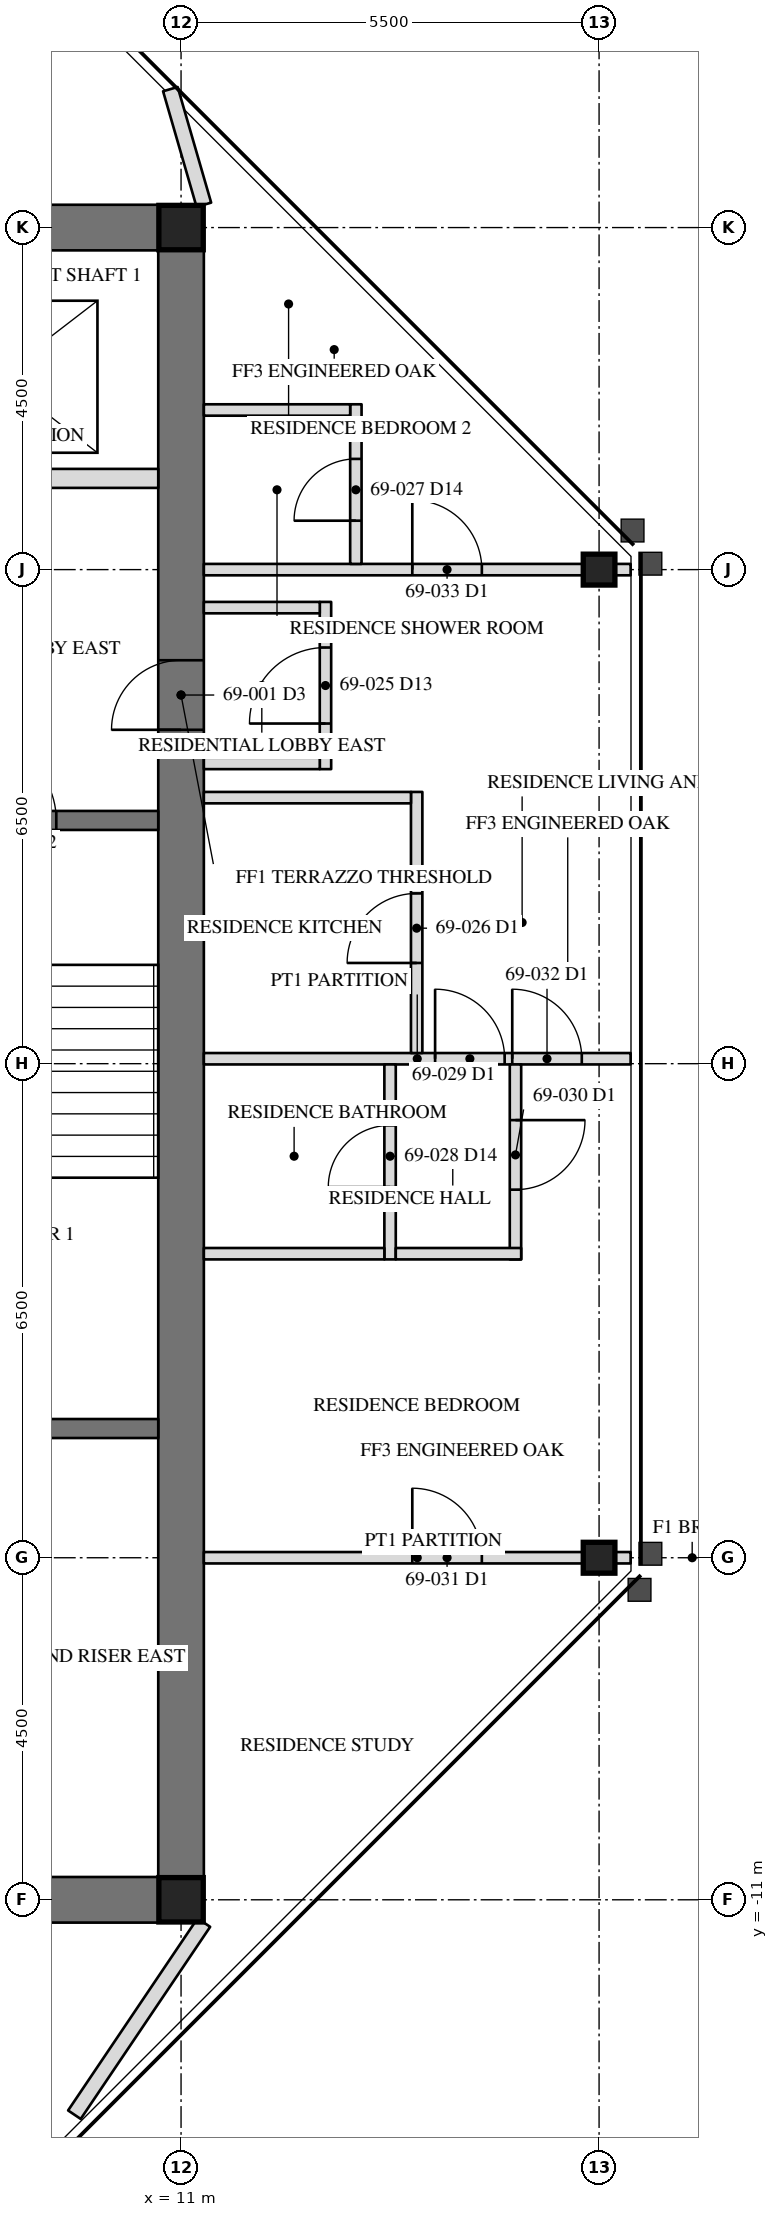
"""IFC4 building model, lengths in metres.
Left out: names, types, materials, properties, quantities, classifications, styles, units other than length and angle.
Written with IfcOpenShell. Run it as: python <this file> out.ifc"""

import sys

from ifc_helpers import new_model, si_unit, direction, frame, frame_2d, origin, origin_2d, place, context, subcontext, project, spatial, rectangle, hollow_rectangle, i_section, extrude, element, fill, save


model = new_model("IFC4")
c1 = context("Model", 3, precision=1e-05, world=origin(), true_north=direction((0.0, 1.0)))
c2 = subcontext(c1, "Body", "Model", "MODEL_VIEW")
j1 = project(units=[si_unit("LENGTHUNIT", "METRE"), si_unit("PLANEANGLEUNIT", "RADIAN")], contexts=[c1])
p1 = place(None, origin())
s1 = spatial("IfcSite", under=j1, at=p1, CompositionType="ELEMENT")
p2 = place(p1, origin())
s2 = spatial("IfcBuilding", under=s1, at=p2, CompositionType="ELEMENT")
p3 = place(p2, frame((0.0, 0.0, 281.2)))
s3 = spatial("IfcBuildingStorey", under=s2, at=p3, CompositionType="ELEMENT", Elevation=281.2)
for number, where, z_axis, x_axis in (
    (1, (16.5, -6.5, 0.0), (0.0, 0.0, 1.0), (0.0, 1.0, 0.0)),
    (2, (16.5, 6.5, 0.0), (0.0, 0.0, 1.0), (0.0, 1.0, 0.0)),
):
    element("IfcColumn", number, at=place(p3, frame(where, z_axis=z_axis, x_axis=x_axis)), inside=s3, PredefinedType="COLUMN", context=c2, shape_type="SweptSolid", body=[
        extrude(i_section(OverallWidth=0.406, OverallDepth=0.417, WebThickness=0.03, FlangeThickness=0.048, at=origin_2d()), origin(), (0.0, 0.0, 1.0), 3.6),
    ])
p4 = place(p3, frame((11.0, -11.0, 0.0), z_axis=(0.0, 0.0, 1.0), x_axis=(0.0, 1.0, 0.0)))
e3 = element("IfcWall", 3, at=p4, inside=s3, PredefinedType="SHEAR", context=c2, shape_type="SweptSolid", body=[
    extrude(rectangle(XDim=22.0, YDim=0.6, at=frame_2d((11.0, 0.0))), origin(), (0.0, 0.0, 1.0), 3.6),
])
p5 = place(p4, frame((15.393, 0.0, 0.0)))
e4 = element("IfcOpeningElement", 4, at=p5, cuts=e3, PredefinedType="OPENING", context=c2, shape_type="SweptSolid", body=[
    extrude(rectangle(XDim=0.915, YDim=2.134, at=frame_2d((0.458, 1.067))), frame((0.0, 0.31, 0.0), z_axis=(0.0, -1.0, 0.0), x_axis=(1.0, 0.0, 0.0)), (0.0, 0.0, 1.0), 0.62),
])
for number, where, z_axis, x_axis in (
    (5, (11.0, 11.0, 0.0), (0.0, 0.0, 1.0), (-1.0, 0.0, 0.0)),
    (6, (6.5, -11.0, 0.0), (0.0, 0.0, 1.0), (1.0, 0.0, 0.0)),
):
    element("IfcWall", number, at=place(p3, frame(where, z_axis=z_axis, x_axis=x_axis)), inside=s3, PredefinedType="SHEAR", context=c2, shape_type="SweptSolid", body=[
        extrude(rectangle(XDim=4.5, YDim=0.6, at=frame_2d((2.25, 0.0))), origin(), (0.0, 0.0, 1.0), 3.6),
    ])
for number, where, z_axis, x_axis in (
    (7, (11.0, 11.0, 0.0), (0.0, 0.0, 1.0), (1.0, 0.0, 0.0)),
    (8, (11.0, -11.0, 0.0), (0.0, 0.0, 1.0), (1.0, 0.0, 0.0)),
):
    element("IfcColumn", number, at=place(p3, frame(where, z_axis=z_axis, x_axis=x_axis)), inside=s3, PredefinedType="COLUMN", context=c2, shape_type="SweptSolid", body=[
        extrude(hollow_rectangle(XDim=0.584, YDim=0.584, WallThickness=0.051, at=origin_2d()), origin(), (0.0, 0.0, 1.0), 3.6),
    ])
p6 = place(p3, frame((6.95, -4.8, 0.0), z_axis=(0.0, 0.0, 1.0), x_axis=(1.0, 0.0, 0.0)))
e9 = element("IfcWall", 9, at=p6, inside=s3, PredefinedType="SOLIDWALL", context=c2, shape_type="SweptSolid", body=[
    extrude(rectangle(XDim=3.75, YDim=0.25, at=frame_2d((1.875, 0.0))), origin(), (0.0, 0.0, 1.0), 3.41),
])
p7 = place(p3, frame((6.95, 3.2, 0.0), z_axis=(0.0, 0.0, 1.0), x_axis=(1.0, 0.0, 0.0)))
e10 = element("IfcWall", 10, at=p7, inside=s3, PredefinedType="SOLIDWALL", context=c2, shape_type="SweptSolid", body=[
    extrude(rectangle(XDim=3.75, YDim=0.25, at=frame_2d((1.875, 0.0))), origin(), (0.0, 0.0, 1.0), 3.41),
])
p8 = place(p7, frame((1.342, 0.0, 0.0)))
e11 = element("IfcOpeningElement", 11, at=p8, cuts=e10, PredefinedType="OPENING", context=c2, shape_type="SweptSolid", body=[
    extrude(rectangle(XDim=1.067, YDim=2.134, at=frame_2d((0.533, 1.067))), frame((0.0, 0.135, 0.0), z_axis=(0.0, -1.0, 0.0), x_axis=(1.0, 0.0, 0.0)), (0.0, 0.0, 1.0), 0.27),
])
p9 = place(p3, frame((6.95, 7.7, 0.0), z_axis=(0.0, 0.0, 1.0), x_axis=(1.0, 0.0, 0.0)))
e12 = element("IfcWall", 12, at=p9, inside=s3, PredefinedType="PARTITIONING", context=c2, shape_type="SweptSolid", body=[
    extrude(rectangle(XDim=3.75, YDim=0.25, at=frame_2d((1.875, 0.0))), origin(), (0.0, 0.0, 1.0), 3.41),
])
p10 = place(p9, frame((0.45, 0.0, 0.0)))
e13 = element("IfcOpeningElement", 13, at=p10, cuts=e12, PredefinedType="OPENING", context=c2, shape_type="SweptSolid", body=[
    extrude(rectangle(XDim=1.219, YDim=2.134, at=frame_2d((0.609, 1.067))), frame((0.0, 0.135, 0.0), z_axis=(0.0, -1.0, 0.0), x_axis=(1.0, 0.0, 0.0)), (0.0, 0.0, 1.0), 0.27),
])
p11 = place(p3, frame((11.3, 11.3, 0.0), z_axis=(0.0, 0.0, 1.0), x_axis=(-0.278099250491, 0.960552344683, 0.0)))
e14 = element("IfcWall", 14, at=p11, inside=s3, PredefinedType="PARTITIONING", context=c2, shape_type="SweptSolid", body=[
    extrude(rectangle(XDim=1.584, YDim=0.2, at=frame_2d((0.792, 0.0))), origin(), (0.0, 0.0, 1.0), 3.41),
])
p12 = place(p3, frame((11.3, -11.3, 0.0), z_axis=(0.0, 0.0, 1.0), x_axis=(-0.558834300538, -0.829279340477, 0.0)))
e15 = element("IfcWall", 15, at=p12, inside=s3, PredefinedType="PARTITIONING", context=c2, shape_type="SweptSolid", body=[
    extrude(rectangle(XDim=3.048, YDim=0.2, at=frame_2d((1.524, 0.0))), origin(), (0.0, 0.0, 1.0), 2.704),
])
p13 = place(p3, frame((11.3, -6.5, 0.0), z_axis=(0.0, 0.0, 1.0), x_axis=(1.0, 0.0, 0.0)))
e16 = element("IfcWall", 16, at=p13, inside=s3, PredefinedType="PARTITIONING", context=c2, shape_type="SweptSolid", body=[
    extrude(rectangle(XDim=5.615, YDim=0.15, at=frame_2d((2.808, 0.0))), origin(), (0.0, 0.0, 1.0), 2.966),
])
p14 = place(p13, frame((2.742, 0.0, 0.0)))
e17 = element("IfcOpeningElement", 17, at=p14, cuts=e16, PredefinedType="OPENING", context=c2, shape_type="SweptSolid", body=[
    extrude(rectangle(XDim=0.915, YDim=2.134, at=frame_2d((0.458, 1.067))), frame((0.0, 0.085, 0.0), z_axis=(0.0, -1.0, 0.0), x_axis=(1.0, 0.0, 0.0)), (0.0, 0.0, 1.0), 0.17),
])
p15 = place(p3, frame((11.3, 0.065, 0.0), z_axis=(0.0, 0.0, 1.0), x_axis=(1.0, 0.0, 0.0)))
e18 = element("IfcWall", 18, at=p15, inside=s3, PredefinedType="PARTITIONING", context=c2, shape_type="SweptSolid", body=[
    extrude(rectangle(XDim=5.615, YDim=0.15, at=frame_2d((2.808, 0.0))), origin(), (0.0, 0.0, 1.0), 2.709),
])
p16 = place(p15, frame((3.042, 0.0, 0.0)))
e19 = element("IfcOpeningElement", 19, at=p16, cuts=e18, PredefinedType="OPENING", context=c2, shape_type="SweptSolid", body=[
    extrude(rectangle(XDim=0.915, YDim=2.134, at=frame_2d((0.458, 1.067))), frame((0.0, 0.085, 0.0), z_axis=(0.0, -1.0, 0.0), x_axis=(1.0, 0.0, 0.0)), (0.0, 0.0, 1.0), 0.17),
])
p17 = place(p15, frame((4.058, 0.0, 0.0)))
e20 = element("IfcOpeningElement", 20, at=p17, cuts=e18, PredefinedType="OPENING", context=c2, shape_type="SweptSolid", body=[
    extrude(rectangle(XDim=0.915, YDim=2.134, at=frame_2d((0.458, 1.067))), frame((0.0, 0.085, 0.0), z_axis=(0.0, -1.0, 0.0), x_axis=(1.0, 0.0, 0.0)), (0.0, 0.0, 1.0), 0.17),
])
p18 = place(p3, frame((11.3, 6.5, 0.0), z_axis=(0.0, 0.0, 1.0), x_axis=(1.0, 0.0, 0.0)))
e21 = element("IfcWall", 21, at=p18, inside=s3, PredefinedType="PARTITIONING", context=c2, shape_type="SweptSolid", body=[
    extrude(rectangle(XDim=5.615, YDim=0.15, at=frame_2d((2.808, 0.0))), origin(), (0.0, 0.0, 1.0), 2.966),
])
p19 = place(p18, frame((2.742, 0.0, 0.0)))
e22 = element("IfcOpeningElement", 22, at=p19, cuts=e21, PredefinedType="OPENING", context=c2, shape_type="SweptSolid", body=[
    extrude(rectangle(XDim=0.915, YDim=2.134, at=frame_2d((0.458, 1.067))), frame((0.0, 0.085, 0.0), z_axis=(0.0, -1.0, 0.0), x_axis=(1.0, 0.0, 0.0)), (0.0, 0.0, 1.0), 0.17),
])
p20 = place(p3, frame((12.9, 3.875, 0.0), z_axis=(0.0, 0.0, 1.0), x_axis=(0.0, 1.0, 0.0)))
e23 = element("IfcWall", 23, at=p20, inside=s3, PredefinedType="PARTITIONING", context=c2, shape_type="SweptSolid", body=[
    extrude(rectangle(XDim=2.2, YDim=0.15, at=frame_2d((1.1, 0.0))), origin(), (0.0, 0.0, 1.0), 3.41),
])
p21 = place(p20, frame((0.6, 0.0, 0.0)))
e24 = element("IfcOpeningElement", 24, at=p21, cuts=e23, PredefinedType="OPENING", context=c2, shape_type="SweptSolid", body=[
    extrude(rectangle(XDim=1.0, YDim=2.134, at=frame_2d((0.5, 1.067))), frame((0.0, 0.085, 0.0), z_axis=(0.0, -1.0, 0.0), x_axis=(1.0, 0.0, 0.0)), (0.0, 0.0, 1.0), 0.17),
])
for number, where, z_axis, x_axis in (
    (25, (11.3, 3.95, 0.0), (0.0, 0.0, 1.0), (1.0, 0.0, 0.0)),
    (26, (11.3, 6.0, 0.0), (0.0, 0.0, 1.0), (1.0, 0.0, 0.0)),
):
    element("IfcWall", number, at=place(p3, frame(where, z_axis=z_axis, x_axis=x_axis)), inside=s3, PredefinedType="PARTITIONING", context=c2, shape_type="SweptSolid", body=[
        extrude(rectangle(XDim=1.525, YDim=0.15, at=frame_2d((0.762, 0.0))), origin(), (0.0, 0.0, 1.0), 3.41),
    ])
p22 = place(p3, frame((14.1, 0.14, 0.0), z_axis=(0.0, 0.0, 1.0), x_axis=(0.0, 1.0, 0.0)))
e27 = element("IfcWall", 27, at=p22, inside=s3, PredefinedType="PARTITIONING", context=c2, shape_type="SweptSolid", body=[
    extrude(rectangle(XDim=3.435, YDim=0.15, at=frame_2d((1.718, 0.0))), origin(), (0.0, 0.0, 1.0), 3.41),
])
p23 = place(p22, frame((1.185, 0.0, 0.0)))
e28 = element("IfcOpeningElement", 28, at=p23, cuts=e27, PredefinedType="OPENING", context=c2, shape_type="SweptSolid", body=[
    extrude(rectangle(XDim=0.915, YDim=2.134, at=frame_2d((0.458, 1.067))), frame((0.0, 0.085, 0.0), z_axis=(0.0, -1.0, 0.0), x_axis=(1.0, 0.0, 0.0)), (0.0, 0.0, 1.0), 0.17),
])
p24 = place(p3, frame((11.3, 3.5, 0.0), z_axis=(0.0, 0.0, 1.0), x_axis=(1.0, 0.0, 0.0)))
e29 = element("IfcWall", 29, at=p24, inside=s3, PredefinedType="PARTITIONING", context=c2, shape_type="SweptSolid", body=[
    extrude(rectangle(XDim=2.725, YDim=0.15, at=frame_2d((1.362, 0.0))), origin(), (0.0, 0.0, 1.0), 3.41),
])
p25 = place(p3, frame((13.3, 6.575, 0.0), z_axis=(0.0, 0.0, 1.0), x_axis=(0.0, 1.0, 0.0)))
e30 = element("IfcWall", 30, at=p25, inside=s3, PredefinedType="PARTITIONING", context=c2, shape_type="SweptSolid", body=[
    extrude(rectangle(XDim=2.1, YDim=0.15, at=frame_2d((1.05, 0.0))), origin(), (0.0, 0.0, 1.0), 3.41),
])
p26 = place(p25, frame((0.569, 0.0, 0.0)))
e31 = element("IfcOpeningElement", 31, at=p26, cuts=e30, PredefinedType="OPENING", context=c2, shape_type="SweptSolid", body=[
    extrude(rectangle(XDim=0.813, YDim=2.032, at=frame_2d((0.406, 1.016))), frame((0.0, 0.085, 0.0), z_axis=(0.0, -1.0, 0.0), x_axis=(1.0, 0.0, 0.0)), (0.0, 0.0, 1.0), 0.17),
])
p27 = place(p3, frame((11.3, 8.6, 0.0), z_axis=(0.0, 0.0, 1.0), x_axis=(1.0, 0.0, 0.0)))
e32 = element("IfcWall", 32, at=p27, inside=s3, PredefinedType="PARTITIONING", context=c2, shape_type="SweptSolid", body=[
    extrude(rectangle(XDim=1.925, YDim=0.15, at=frame_2d((0.962, 0.0))), origin(), (0.0, 0.0, 1.0), 3.41),
])
p28 = place(p3, frame((13.75, -2.575, 0.0), z_axis=(0.0, 0.0, 1.0), x_axis=(0.0, 1.0, 0.0)))
e33 = element("IfcWall", 33, at=p28, inside=s3, PredefinedType="PARTITIONING", context=c2, shape_type="SweptSolid", body=[
    extrude(rectangle(XDim=2.565, YDim=0.15, at=frame_2d((1.282, 0.0))), origin(), (0.0, 0.0, 1.0), 3.41),
])
p29 = place(p28, frame((0.951, 0.0, 0.0)))
e34 = element("IfcOpeningElement", 34, at=p29, cuts=e33, PredefinedType="OPENING", context=c2, shape_type="SweptSolid", body=[
    extrude(rectangle(XDim=0.813, YDim=2.032, at=frame_2d((0.406, 1.016))), frame((0.0, 0.085, 0.0), z_axis=(0.0, -1.0, 0.0), x_axis=(1.0, 0.0, 0.0)), (0.0, 0.0, 1.0), 0.17),
])
p30 = place(p3, frame((11.3, -2.5, 0.0), z_axis=(0.0, 0.0, 1.0), x_axis=(1.0, 0.0, 0.0)))
e35 = element("IfcWall", 35, at=p30, inside=s3, PredefinedType="PARTITIONING", context=c2, shape_type="SweptSolid", body=[
    extrude(rectangle(XDim=2.375, YDim=0.15, at=frame_2d((1.188, 0.0))), origin(), (0.0, 0.0, 1.0), 3.41),
])
p31 = place(p3, frame((15.4, -0.01, 0.0), z_axis=(0.0, 0.0, 1.0), x_axis=(0.0, -1.0, 0.0)))
e36 = element("IfcWall", 36, at=p31, inside=s3, PredefinedType="PARTITIONING", context=c2, shape_type="SweptSolid", body=[
    extrude(rectangle(XDim=2.565, YDim=0.15, at=frame_2d((1.282, 0.0))), origin(), (0.0, 0.0, 1.0), 3.41),
])
p32 = place(p31, frame((0.732, 0.0, 0.0)))
e37 = element("IfcOpeningElement", 37, at=p32, cuts=e36, PredefinedType="OPENING", context=c2, shape_type="SweptSolid", body=[
    extrude(rectangle(XDim=0.915, YDim=2.134, at=frame_2d((0.458, 1.067))), frame((0.0, 0.085, 0.0), z_axis=(0.0, -1.0, 0.0), x_axis=(1.0, 0.0, 0.0)), (0.0, 0.0, 1.0), 0.17),
])
p33 = place(p3, frame((13.825, -2.5, 0.0), z_axis=(0.0, 0.0, 1.0), x_axis=(1.0, 0.0, 0.0)))
e38 = element("IfcWall", 38, at=p33, inside=s3, PredefinedType="PARTITIONING", context=c2, shape_type="SweptSolid", body=[
    extrude(rectangle(XDim=1.65, YDim=0.15, at=frame_2d((0.825, 0.0))), origin(), (0.0, 0.0, 1.0), 3.41),
])
p34 = place(p5, origin())
e39 = element("IfcDoor", 39, at=p34, inside=s3, OperationType="SINGLE_SWING_RIGHT", PredefinedType="DOOR", context=c2, shape_type="SweptSolid", body=[
    extrude(rectangle(XDim=0.915, YDim=2.134, at=frame_2d((0.458, 1.067))), frame((0.0, -0.225, 0.0), z_axis=(0.0, -1.0, 0.0), x_axis=(1.0, 0.0, 0.0)), (0.0, 0.0, 1.0), 0.05),
])
fill(e4, e39)
p35 = place(p8, origin())
e40 = element("IfcDoor", 40, at=p35, inside=s3, OperationType="SINGLE_SWING_LEFT", PredefinedType="DOOR", context=c2, shape_type="SweptSolid", body=[
    extrude(rectangle(XDim=1.067, YDim=2.134, at=frame_2d((0.533, 1.067))), frame((0.0, 0.025, 0.0), z_axis=(0.0, -1.0, 0.0), x_axis=(1.0, 0.0, 0.0)), (0.0, 0.0, 1.0), 0.05),
])
fill(e11, e40)
p36 = place(p21, origin())
e41 = element("IfcDoor", 41, at=p36, inside=s3, OperationType="SINGLE_SWING_RIGHT", PredefinedType="DOOR", context=c2, shape_type="SweptSolid", body=[
    extrude(rectangle(XDim=1.0, YDim=2.134, at=frame_2d((0.5, 1.067))), frame((0.0, 0.025, 0.0), z_axis=(0.0, -1.0, 0.0), x_axis=(1.0, 0.0, 0.0)), (0.0, 0.0, 1.0), 0.05),
])
fill(e24, e41)
p37 = place(p23, origin())
e42 = element("IfcDoor", 42, at=p37, inside=s3, OperationType="SINGLE_SWING_LEFT", PredefinedType="DOOR", context=c2, shape_type="SweptSolid", body=[
    extrude(rectangle(XDim=0.915, YDim=2.134, at=frame_2d((0.458, 1.067))), frame((0.0, 0.025, 0.0), z_axis=(0.0, -1.0, 0.0), x_axis=(1.0, 0.0, 0.0)), (0.0, 0.0, 1.0), 0.05),
])
fill(e28, e42)
p38 = place(p26, origin())
e43 = element("IfcDoor", 43, at=p38, inside=s3, OperationType="SINGLE_SWING_LEFT", PredefinedType="DOOR", context=c2, shape_type="SweptSolid", body=[
    extrude(rectangle(XDim=0.813, YDim=2.032, at=frame_2d((0.406, 1.016))), frame((0.0, 0.025, 0.0), z_axis=(0.0, -1.0, 0.0), x_axis=(1.0, 0.0, 0.0)), (0.0, 0.0, 1.0), 0.05),
])
fill(e31, e43)
p39 = place(p29, origin())
e44 = element("IfcDoor", 44, at=p39, inside=s3, OperationType="SINGLE_SWING_LEFT", PredefinedType="DOOR", context=c2, shape_type="SweptSolid", body=[
    extrude(rectangle(XDim=0.813, YDim=2.032, at=frame_2d((0.406, 1.016))), frame((0.0, 0.025, 0.0), z_axis=(0.0, -1.0, 0.0), x_axis=(1.0, 0.0, 0.0)), (0.0, 0.0, 1.0), 0.05),
])
fill(e34, e44)
p40 = place(p16, origin())
e45 = element("IfcDoor", 45, at=p40, inside=s3, OperationType="SINGLE_SWING_LEFT", PredefinedType="DOOR", context=c2, shape_type="SweptSolid", body=[
    extrude(rectangle(XDim=0.915, YDim=2.134, at=frame_2d((0.458, 1.067))), frame((0.0, 0.025, 0.0), z_axis=(0.0, -1.0, 0.0), x_axis=(1.0, 0.0, 0.0)), (0.0, 0.0, 1.0), 0.05),
])
fill(e19, e45)
p41 = place(p32, origin())
e46 = element("IfcDoor", 46, at=p41, inside=s3, OperationType="SINGLE_SWING_LEFT", PredefinedType="DOOR", context=c2, shape_type="SweptSolid", body=[
    extrude(rectangle(XDim=0.915, YDim=2.134, at=frame_2d((0.458, 1.067))), frame((0.0, 0.025, 0.0), z_axis=(0.0, -1.0, 0.0), x_axis=(1.0, 0.0, 0.0)), (0.0, 0.0, 1.0), 0.05),
])
fill(e37, e46)
p42 = place(p14, origin())
e47 = element("IfcDoor", 47, at=p42, inside=s3, OperationType="SINGLE_SWING_LEFT", PredefinedType="DOOR", context=c2, shape_type="SweptSolid", body=[
    extrude(rectangle(XDim=0.915, YDim=2.134, at=frame_2d((0.458, 1.067))), frame((0.0, 0.025, 0.0), z_axis=(0.0, -1.0, 0.0), x_axis=(1.0, 0.0, 0.0)), (0.0, 0.0, 1.0), 0.05),
])
fill(e17, e47)
p43 = place(p17, origin())
e48 = element("IfcDoor", 48, at=p43, inside=s3, OperationType="SINGLE_SWING_LEFT", PredefinedType="DOOR", context=c2, shape_type="SweptSolid", body=[
    extrude(rectangle(XDim=0.915, YDim=2.134, at=frame_2d((0.458, 1.067))), frame((0.0, 0.025, 0.0), z_axis=(0.0, -1.0, 0.0), x_axis=(1.0, 0.0, 0.0)), (0.0, 0.0, 1.0), 0.05),
])
fill(e20, e48)
p44 = place(p19, origin())
e49 = element("IfcDoor", 49, at=p44, inside=s3, OperationType="SINGLE_SWING_LEFT", PredefinedType="DOOR", context=c2, shape_type="SweptSolid", body=[
    extrude(rectangle(XDim=0.915, YDim=2.134, at=frame_2d((0.458, 1.067))), frame((0.0, 0.025, 0.0), z_axis=(0.0, -1.0, 0.0), x_axis=(1.0, 0.0, 0.0)), (0.0, 0.0, 1.0), 0.05),
])
fill(e22, e49)
save(model, sys.argv[1])
